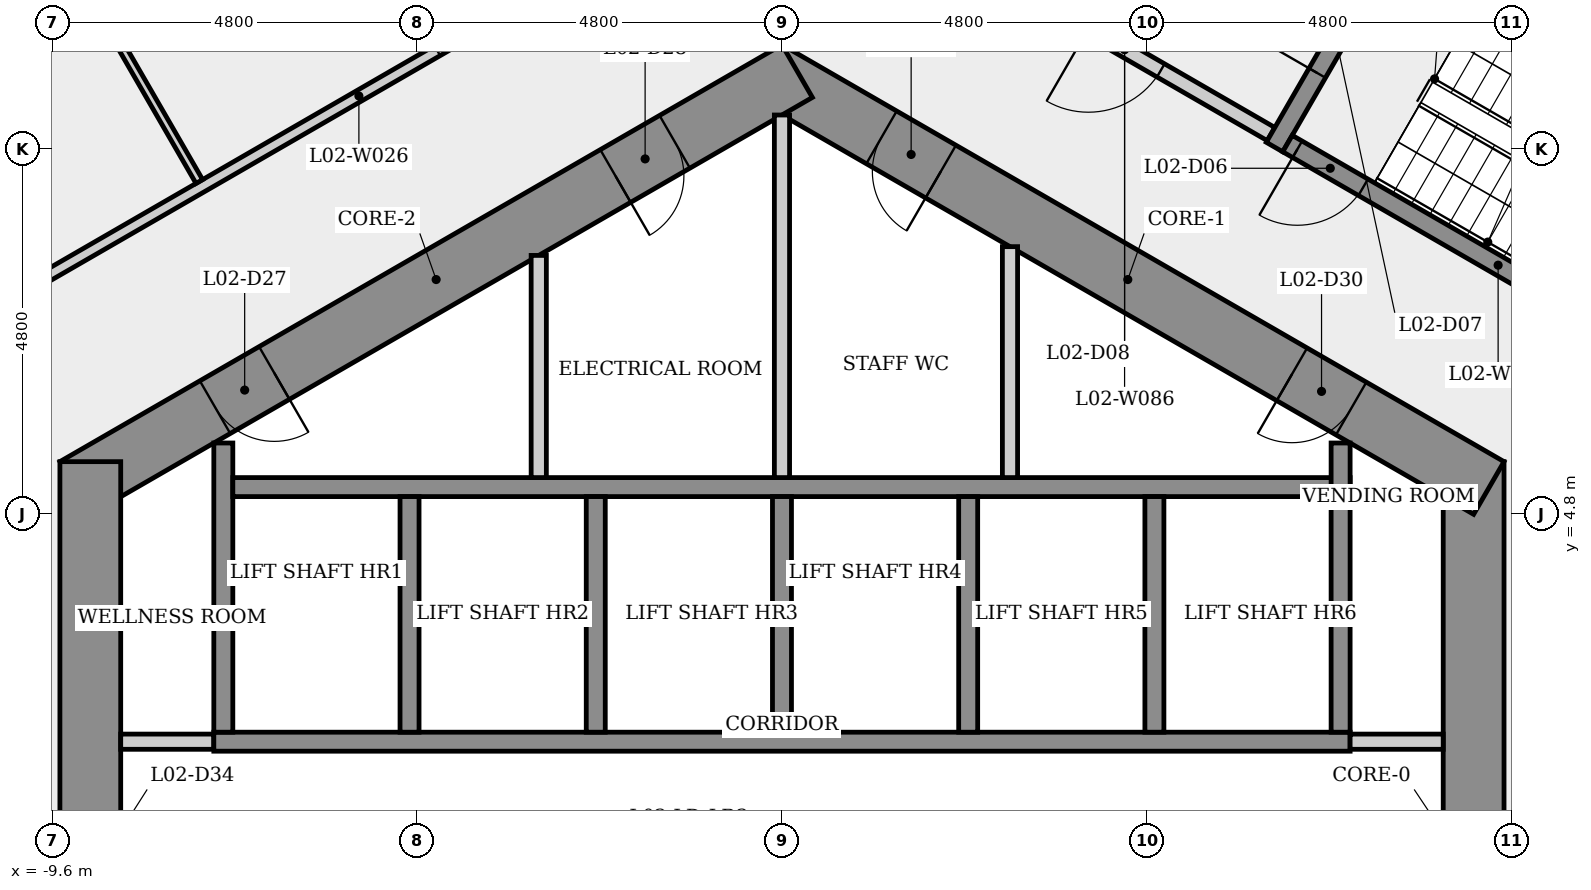
"""IFC4 building model, lengths in metres.
Left out: names, types, materials, properties, quantities, classifications, styles, units other than length and angle.
Written with IfcOpenShell. Run it as: python <this file> out.ifc"""

import sys

from ifc_helpers import new_model, si_unit, direction, frame, frame_2d, origin, place, context, subcontext, project, spatial, rectangle, extrude, element, fill, save


model = new_model("IFC4")
c1 = context("Model", 3, precision=1e-05, world=origin(), true_north=direction((0.0, 1.0)))
c2 = subcontext(c1, "Body", "Model", "MODEL_VIEW")
j1 = project(units=[si_unit("LENGTHUNIT", "METRE"), si_unit("PLANEANGLEUNIT", "RADIAN")], contexts=[c1])
p1 = place(None, origin())
s1 = spatial("IfcSite", under=j1, at=p1, CompositionType="ELEMENT")
p2 = place(p1, origin())
s2 = spatial("IfcBuilding", under=s1, at=p2, CompositionType="ELEMENT")
p3 = place(p2, frame((0.0, 0.0, 11.5)))
s3 = spatial("IfcBuildingStorey", under=s2, at=p3, CompositionType="ELEMENT", Elevation=11.5)
p4 = place(p3, frame((9.1, -5.485, 0.0), z_axis=(0.0, 0.0, 1.0), x_axis=(0.0, 1.0, 0.0)))
e1 = element("IfcWall", 1, at=p4, inside=s3, PredefinedType="SHEAR", context=c2, shape_type="SweptSolid", body=[
    extrude(rectangle(XDim=10.97, YDim=0.8, at=frame_2d((5.485, 0.0))), origin(), (0.0, 0.0, 1.0), 4.5),
])
p5 = place(p4, frame((4.685, 0.0, 0.0)))
e2 = element("IfcOpeningElement", 2, at=p5, cuts=e1, PredefinedType="OPENING", context=c2, shape_type="SweptSolid", body=[
    extrude(rectangle(XDim=1.6, YDim=2.1, at=frame_2d((0.8, 1.05))), frame((0.0, 0.41, 0.0), z_axis=(0.0, -1.0, 0.0), x_axis=(1.0, 0.0, 0.0)), (0.0, 0.0, 1.0), 0.82),
])
p6 = place(p3, frame((9.3, 5.138, 0.0), z_axis=(0.0, 0.0, 1.0), x_axis=(-0.866023993627, 0.500002442456, 0.0)))
e3 = element("IfcWall", 3, at=p6, inside=s3, PredefinedType="SHEAR", context=c2, shape_type="SweptSolid", body=[
    extrude(rectangle(XDim=10.97, YDim=0.8, at=frame_2d((5.485, 0.0))), origin(), (0.0, 0.0, 1.0), 4.5),
])
p7 = place(p6, frame((8.326, 0.0, 0.0)))
e4 = element("IfcOpeningElement", 4, at=p7, cuts=e3, PredefinedType="OPENING", context=c2, shape_type="SweptSolid", body=[
    extrude(rectangle(XDim=0.9, YDim=2.1, at=frame_2d((0.45, 1.05))), frame((0.0, 0.41, 0.0), z_axis=(0.0, -1.0, 0.0), x_axis=(1.0, 0.0, 0.0)), (0.0, 0.0, 1.0), 0.82),
])
p8 = place(p6, frame((2.091, 0.0, 0.0)))
e5 = element("IfcOpeningElement", 5, at=p8, cuts=e3, PredefinedType="OPENING", context=c2, shape_type="SweptSolid", body=[
    extrude(rectangle(XDim=0.9, YDim=2.1, at=frame_2d((0.45, 1.05))), frame((0.0, 0.41, 0.0), z_axis=(0.0, -1.0, 0.0), x_axis=(1.0, 0.0, 0.0)), (0.0, 0.0, 1.0), 0.82),
])
p9 = place(p3, frame((0.2, 10.623, 0.0), z_axis=(0.0, 0.0, 1.0), x_axis=(-0.866023993627, -0.500002442456, 0.0)))
e6 = element("IfcWall", 6, at=p9, inside=s3, PredefinedType="SHEAR", context=c2, shape_type="SweptSolid", body=[
    extrude(rectangle(XDim=10.97, YDim=0.8, at=frame_2d((5.485, 0.0))), origin(), (0.0, 0.0, 1.0), 4.5),
])
p10 = place(p9, frame((7.944, 0.0, 0.0)))
e7 = element("IfcOpeningElement", 7, at=p10, cuts=e6, PredefinedType="OPENING", context=c2, shape_type="SweptSolid", body=[
    extrude(rectangle(XDim=0.9, YDim=2.1, at=frame_2d((0.45, 1.05))), frame((0.0, 0.41, 0.0), z_axis=(0.0, -1.0, 0.0), x_axis=(1.0, 0.0, 0.0)), (0.0, 0.0, 1.0), 0.82),
])
p11 = place(p9, frame((1.86, 0.0, 0.0)))
e8 = element("IfcOpeningElement", 8, at=p11, cuts=e6, PredefinedType="OPENING", context=c2, shape_type="SweptSolid", body=[
    extrude(rectangle(XDim=0.9, YDim=2.1, at=frame_2d((0.45, 1.05))), frame((0.0, 0.41, 0.0), z_axis=(0.0, -1.0, 0.0), x_axis=(1.0, 0.0, 0.0)), (0.0, 0.0, 1.0), 0.82),
])
p12 = place(p3, frame((-9.1, 5.485, 0.0), z_axis=(0.0, 0.0, 1.0), x_axis=(0.0, -1.0, 0.0)))
e9 = element("IfcWall", 9, at=p12, inside=s3, PredefinedType="SHEAR", context=c2, shape_type="SweptSolid", body=[
    extrude(rectangle(XDim=10.97, YDim=0.8, at=frame_2d((5.485, 0.0))), origin(), (0.0, 0.0, 1.0), 4.5),
])
p13 = place(p12, frame((4.685, 0.0, 0.0)))
e10 = element("IfcOpeningElement", 10, at=p13, cuts=e9, PredefinedType="OPENING", context=c2, shape_type="SweptSolid", body=[
    extrude(rectangle(XDim=1.6, YDim=2.1, at=frame_2d((0.8, 1.05))), frame((0.0, 0.41, 0.0), z_axis=(0.0, -1.0, 0.0), x_axis=(1.0, 0.0, 0.0)), (0.0, 0.0, 1.0), 0.82),
])
p14 = place(p3, frame((-10.598, 7.391, 0.0), z_axis=(0.0, 0.0, 1.0), x_axis=(0.866022183431, 0.500005577774, 0.0)))
e11 = element("IfcWall", 11, at=p14, inside=s3, PredefinedType="PARTITIONING", context=c2, shape_type="SweptSolid", body=[
    extrude(rectangle(XDim=11.619, YDim=0.15, at=frame_2d((5.81, 0.0))), origin(), (0.0, 0.0, 1.0), 4.1),
])
p15 = place(p14, frame((7.001, 0.0, 0.0)))
e12 = element("IfcOpeningElement", 12, at=p15, cuts=e11, PredefinedType="OPENING", context=c2, shape_type="SweptSolid", body=[
    extrude(rectangle(XDim=1.0, YDim=2.1, at=frame_2d((0.5, 1.05))), frame((0.0, 0.085, 0.0), z_axis=(0.0, -1.0, 0.0), x_axis=(1.0, 0.0, 0.0)), (0.0, 0.0, 1.0), 0.17),
])
p16 = place(p3, frame((-8.7, 1.8, 0.0), z_axis=(0.0, 0.0, 1.0), x_axis=(1.0, 0.0, 0.0)))
e13 = element("IfcWall", 13, at=p16, inside=s3, PredefinedType="PARTITIONING", context=c2, shape_type="SweptSolid", body=[
    extrude(rectangle(XDim=1.225, YDim=0.2, at=frame_2d((0.613, 0.0))), origin(), (0.0, 0.0, 1.0), 4.1),
])
p17 = place(p3, frame((-7.666, 9.171, 0.0), z_axis=(0.0, 0.0, 1.0), x_axis=(-0.500009404554, 0.866019973994, 0.0)))
e14 = element("IfcWall", 14, at=p17, inside=s3, PredefinedType="PARTITIONING", context=c2, shape_type="SweptSolid", body=[
    extrude(rectangle(XDim=9.01, YDim=0.1, at=frame_2d((4.505, 0.0))), origin(), (0.0, 0.0, 1.0), 4.1),
])
p18 = place(p3, frame((-7.475, 1.8, 0.0), z_axis=(0.0, 0.0, 1.0), x_axis=(1.0, 0.0, 0.0)))
e15 = element("IfcWall", 15, at=p18, inside=s3, PredefinedType="SHEAR", context=c2, shape_type="SweptSolid", body=[
    extrude(rectangle(XDim=14.95, YDim=0.25, at=frame_2d((7.475, 0.0))), origin(), (0.0, 0.0, 1.0), 4.1),
])
p19 = place(p3, frame((-7.35, 1.925, 0.0), z_axis=(0.0, 0.0, 1.0), x_axis=(0.0, 1.0, 0.0)))
e16 = element("IfcWall", 16, at=p19, inside=s3, PredefinedType="SHEAR", context=c2, shape_type="SweptSolid", body=[
    extrude(rectangle(XDim=3.805, YDim=0.25, at=frame_2d((1.903, 0.0))), origin(), (0.0, 0.0, 1.0), 4.1),
])
p20 = place(p3, frame((-7.225, 5.15, 0.0), z_axis=(0.0, 0.0, 1.0), x_axis=(1.0, 0.0, 0.0)))
e17 = element("IfcWall", 17, at=p20, inside=s3, PredefinedType="SHEAR", context=c2, shape_type="SweptSolid", body=[
    extrude(rectangle(XDim=14.7, YDim=0.25, at=frame_2d((7.35, 0.0))), origin(), (0.0, 0.0, 1.0), 4.1),
])
p21 = place(p3, frame((-4.9, 5.025, 0.0), z_axis=(0.0, 0.0, 1.0), x_axis=(0.0, -1.0, 0.0)))
e18 = element("IfcWall", 18, at=p21, inside=s3, PredefinedType="SHEAR", context=c2, shape_type="SweptSolid", body=[
    extrude(rectangle(XDim=3.1, YDim=0.25, at=frame_2d((1.55, 0.0))), origin(), (0.0, 0.0, 1.0), 4.5),
])
p22 = place(p3, frame((-3.2, 8.198, 0.0), z_axis=(0.0, 0.0, 1.0), x_axis=(0.0, -1.0, 0.0)))
e19 = element("IfcWall", 19, at=p22, inside=s3, PredefinedType="PARTITIONING", context=c2, shape_type="SweptSolid", body=[
    extrude(rectangle(XDim=2.924, YDim=0.2, at=frame_2d((1.462, 0.0))), origin(), (0.0, 0.0, 1.0), 4.1),
])
for number, where, z_axis, x_axis in (
    (20, (-2.45, 5.025, 0.0), (0.0, 0.0, 1.0), (0.0, -1.0, 0.0)),
    (21, (0.0, 5.025, 0.0), (0.0, 0.0, 1.0), (0.0, -1.0, 0.0)),
):
    element("IfcWall", number, at=place(p3, frame(where, z_axis=z_axis, x_axis=x_axis)), inside=s3, PredefinedType="SHEAR", context=c2, shape_type="SweptSolid", body=[
        extrude(rectangle(XDim=3.1, YDim=0.25, at=frame_2d((1.55, 0.0))), origin(), (0.0, 0.0, 1.0), 4.5),
    ])
p23 = place(p3, frame((0.0, 10.046, 0.0), z_axis=(0.0, 0.0, 1.0), x_axis=(0.0, -1.0, 0.0)))
e22 = element("IfcWall", 22, at=p23, inside=s3, PredefinedType="PARTITIONING", context=c2, shape_type="SweptSolid", body=[
    extrude(rectangle(XDim=4.771, YDim=0.2, at=frame_2d((2.385, 0.0))), origin(), (0.0, 0.0, 1.0), 4.1),
])
p24 = place(p3, frame((2.45, 5.025, 0.0), z_axis=(0.0, 0.0, 1.0), x_axis=(0.0, -1.0, 0.0)))
e23 = element("IfcWall", 23, at=p24, inside=s3, PredefinedType="SHEAR", context=c2, shape_type="SweptSolid", body=[
    extrude(rectangle(XDim=3.1, YDim=0.25, at=frame_2d((1.55, 0.0))), origin(), (0.0, 0.0, 1.0), 4.5),
])
p25 = place(p3, frame((3.0, 8.314, 0.0), z_axis=(0.0, 0.0, 1.0), x_axis=(0.0, -1.0, 0.0)))
e24 = element("IfcWall", 24, at=p25, inside=s3, PredefinedType="PARTITIONING", context=c2, shape_type="SweptSolid", body=[
    extrude(rectangle(XDim=3.039, YDim=0.2, at=frame_2d((1.52, 0.0))), origin(), (0.0, 0.0, 1.0), 4.1),
])
p26 = place(p3, frame((4.9, 5.025, 0.0), z_axis=(0.0, 0.0, 1.0), x_axis=(0.0, -1.0, 0.0)))
e25 = element("IfcWall", 25, at=p26, inside=s3, PredefinedType="SHEAR", context=c2, shape_type="SweptSolid", body=[
    extrude(rectangle(XDim=3.1, YDim=0.25, at=frame_2d((1.55, 0.0))), origin(), (0.0, 0.0, 1.0), 4.5),
])
p27 = place(p3, frame((6.435, 9.795, 0.0), z_axis=(0.0, 0.0, 1.0), x_axis=(-0.866012907634, 0.500021643343, 0.0)))
e26 = element("IfcWall", 26, at=p27, inside=s3, PredefinedType="PARTITIONING", context=c2, shape_type="SweptSolid", body=[
    extrude(rectangle(XDim=4.45, YDim=0.2, at=frame_2d((2.225, 0.0))), origin(), (0.0, 0.0, 1.0), 4.1),
])
p28 = place(p27, frame((1.675, 0.0, 0.0)))
e27 = element("IfcOpeningElement", 27, at=p28, cuts=e26, PredefinedType="OPENING", context=c2, shape_type="SweptSolid", body=[
    extrude(rectangle(XDim=1.1, YDim=2.1, at=frame_2d((0.55, 1.05))), frame((0.0, 0.11, 0.0), z_axis=(0.0, -1.0, 0.0), x_axis=(1.0, 0.0, 0.0)), (0.0, 0.0, 1.0), 0.22),
])
p29 = place(p3, frame((6.48, 9.624, 0.0), z_axis=(0.0, 0.0, 1.0), x_axis=(0.500017246033, 0.866015446554, 0.0)))
e28 = element("IfcWall", 28, at=p29, inside=s3, PredefinedType="SHEAR", context=c2, shape_type="SweptSolid", body=[
    extrude(rectangle(XDim=3.25, YDim=0.25, at=frame_2d((1.625, 0.0))), origin(), (0.0, 0.0, 1.0), 4.1),
])
p30 = place(p29, frame((1.125, 0.0, 0.0)))
e29 = element("IfcOpeningElement", 29, at=p30, cuts=e28, PredefinedType="OPENING", context=c2, shape_type="SweptSolid", body=[
    extrude(rectangle(XDim=1.0, YDim=2.1, at=frame_2d((0.5, 1.05))), frame((0.0, 0.135, 0.0), z_axis=(0.0, -1.0, 0.0), x_axis=(1.0, 0.0, 0.0)), (0.0, 0.0, 1.0), 0.27),
])
p31 = place(p3, frame((7.475, 1.8, 0.0), z_axis=(0.0, 0.0, 1.0), x_axis=(1.0, 0.0, 0.0)))
e30 = element("IfcWall", 30, at=p31, inside=s3, PredefinedType="PARTITIONING", context=c2, shape_type="SweptSolid", body=[
    extrude(rectangle(XDim=1.225, YDim=0.2, at=frame_2d((0.613, 0.0))), origin(), (0.0, 0.0, 1.0), 4.1),
])
p32 = place(p3, frame((7.35, 5.73, 0.0), z_axis=(0.0, 0.0, 1.0), x_axis=(0.0, -1.0, 0.0)))
e31 = element("IfcWall", 31, at=p32, inside=s3, PredefinedType="SHEAR", context=c2, shape_type="SweptSolid", body=[
    extrude(rectangle(XDim=3.805, YDim=0.25, at=frame_2d((1.903, 0.0))), origin(), (0.0, 0.0, 1.0), 4.1),
])
p33 = place(p3, frame((8.151, 12.268, 0.0), z_axis=(0.0, 0.0, 1.0), x_axis=(0.866025499775, -0.499999833739, 0.0)))
e32 = element("IfcWall", 32, at=p33, inside=s3, PredefinedType="SHEAR", context=c2, shape_type="SweptSolid", body=[
    extrude(rectangle(XDim=6.4, YDim=0.25, at=frame_2d((3.2, 0.0))), origin(), (0.0, 0.0, 1.0), 4.1),
])
p34 = place(p3, frame((12.194, 6.47, 0.0), z_axis=(0.0, 0.0, 1.0), x_axis=(-0.866025499775, 0.499999833739, 0.0)))
e33 = element("IfcWall", 33, at=p34, inside=s3, PredefinedType="SHEAR", context=c2, shape_type="SweptSolid", body=[
    extrude(rectangle(XDim=6.4, YDim=0.25, at=frame_2d((3.2, 0.0))), origin(), (0.0, 0.0, 1.0), 4.1),
])
p35 = place(p34, frame((5.25, 0.0, 0.0)))
e34 = element("IfcOpeningElement", 34, at=p35, cuts=e33, PredefinedType="OPENING", context=c2, shape_type="SweptSolid", body=[
    extrude(rectangle(XDim=1.0, YDim=2.1, at=frame_2d((0.5, 1.05))), frame((0.0, 0.135, 0.0), z_axis=(0.0, -1.0, 0.0), x_axis=(1.0, 0.0, 0.0)), (0.0, 0.0, 1.0), 0.27),
])
p36 = place(p35, origin())
e35 = element("IfcDoor", 35, at=p36, inside=s3, OperationType="SINGLE_SWING_RIGHT", PredefinedType="DOOR", context=c2, shape_type="SweptSolid", body=[
    extrude(rectangle(XDim=1.0, YDim=2.1, at=frame_2d((0.5, 1.05))), frame((0.0, 0.025, 0.0), z_axis=(0.0, -1.0, 0.0), x_axis=(1.0, 0.0, 0.0)), (0.0, 0.0, 1.0), 0.05),
])
fill(e34, e35)
p37 = place(p30, origin())
e36 = element("IfcDoor", 36, at=p37, inside=s3, OperationType="SINGLE_SWING_LEFT", PredefinedType="DOOR", context=c2, shape_type="SweptSolid", body=[
    extrude(rectangle(XDim=1.0, YDim=2.1, at=frame_2d((0.5, 1.05))), frame((0.0, 0.025, 0.0), z_axis=(0.0, -1.0, 0.0), x_axis=(1.0, 0.0, 0.0)), (0.0, 0.0, 1.0), 0.05),
])
fill(e29, e36)
p38 = place(p28, origin())
e37 = element("IfcDoor", 37, at=p38, inside=s3, OperationType="SINGLE_SWING_RIGHT", PredefinedType="DOOR", context=c2, shape_type="SweptSolid", body=[
    extrude(rectangle(XDim=1.1, YDim=2.1, at=frame_2d((0.55, 1.05))), frame((0.0, 0.025, 0.0), z_axis=(0.0, -1.0, 0.0), x_axis=(1.0, 0.0, 0.0)), (0.0, 0.0, 1.0), 0.05),
])
fill(e27, e37)
p39 = place(p15, origin())
e38 = element("IfcDoor", 38, at=p39, inside=s3, OperationType="SINGLE_SWING_LEFT", PredefinedType="DOOR", context=c2, shape_type="SweptSolid", body=[
    extrude(rectangle(XDim=1.0, YDim=2.1, at=frame_2d((0.5, 1.05))), frame((0.0, 0.025, 0.0), z_axis=(0.0, -1.0, 0.0), x_axis=(1.0, 0.0, 0.0)), (0.0, 0.0, 1.0), 0.05),
])
fill(e12, e38)
p40 = place(p10, origin())
e39 = element("IfcDoor", 39, at=p40, inside=s3, OperationType="SINGLE_SWING_LEFT", PredefinedType="DOOR", context=c2, shape_type="SweptSolid", body=[
    extrude(rectangle(XDim=0.9, YDim=2.1, at=frame_2d((0.45, 1.05))), frame((0.0, 0.025, 0.0), z_axis=(0.0, -1.0, 0.0), x_axis=(1.0, 0.0, 0.0)), (0.0, 0.0, 1.0), 0.05),
])
fill(e7, e39)
p41 = place(p11, origin())
e40 = element("IfcDoor", 40, at=p41, inside=s3, OperationType="SINGLE_SWING_RIGHT", PredefinedType="DOOR", context=c2, shape_type="SweptSolid", body=[
    extrude(rectangle(XDim=0.9, YDim=2.1, at=frame_2d((0.45, 1.05))), frame((0.0, 0.025, 0.0), z_axis=(0.0, -1.0, 0.0), x_axis=(1.0, 0.0, 0.0)), (0.0, 0.0, 1.0), 0.05),
])
fill(e8, e40)
p42 = place(p7, origin())
e41 = element("IfcDoor", 41, at=p42, inside=s3, OperationType="SINGLE_SWING_LEFT", PredefinedType="DOOR", context=c2, shape_type="SweptSolid", body=[
    extrude(rectangle(XDim=0.9, YDim=2.1, at=frame_2d((0.45, 1.05))), frame((0.0, 0.025, 0.0), z_axis=(0.0, -1.0, 0.0), x_axis=(1.0, 0.0, 0.0)), (0.0, 0.0, 1.0), 0.05),
])
fill(e4, e41)
p43 = place(p8, origin())
e42 = element("IfcDoor", 42, at=p43, inside=s3, OperationType="SINGLE_SWING_RIGHT", PredefinedType="DOOR", context=c2, shape_type="SweptSolid", body=[
    extrude(rectangle(XDim=0.9, YDim=2.1, at=frame_2d((0.45, 1.05))), frame((0.0, 0.025, 0.0), z_axis=(0.0, -1.0, 0.0), x_axis=(1.0, 0.0, 0.0)), (0.0, 0.0, 1.0), 0.05),
])
fill(e5, e42)
save(model, sys.argv[1])
